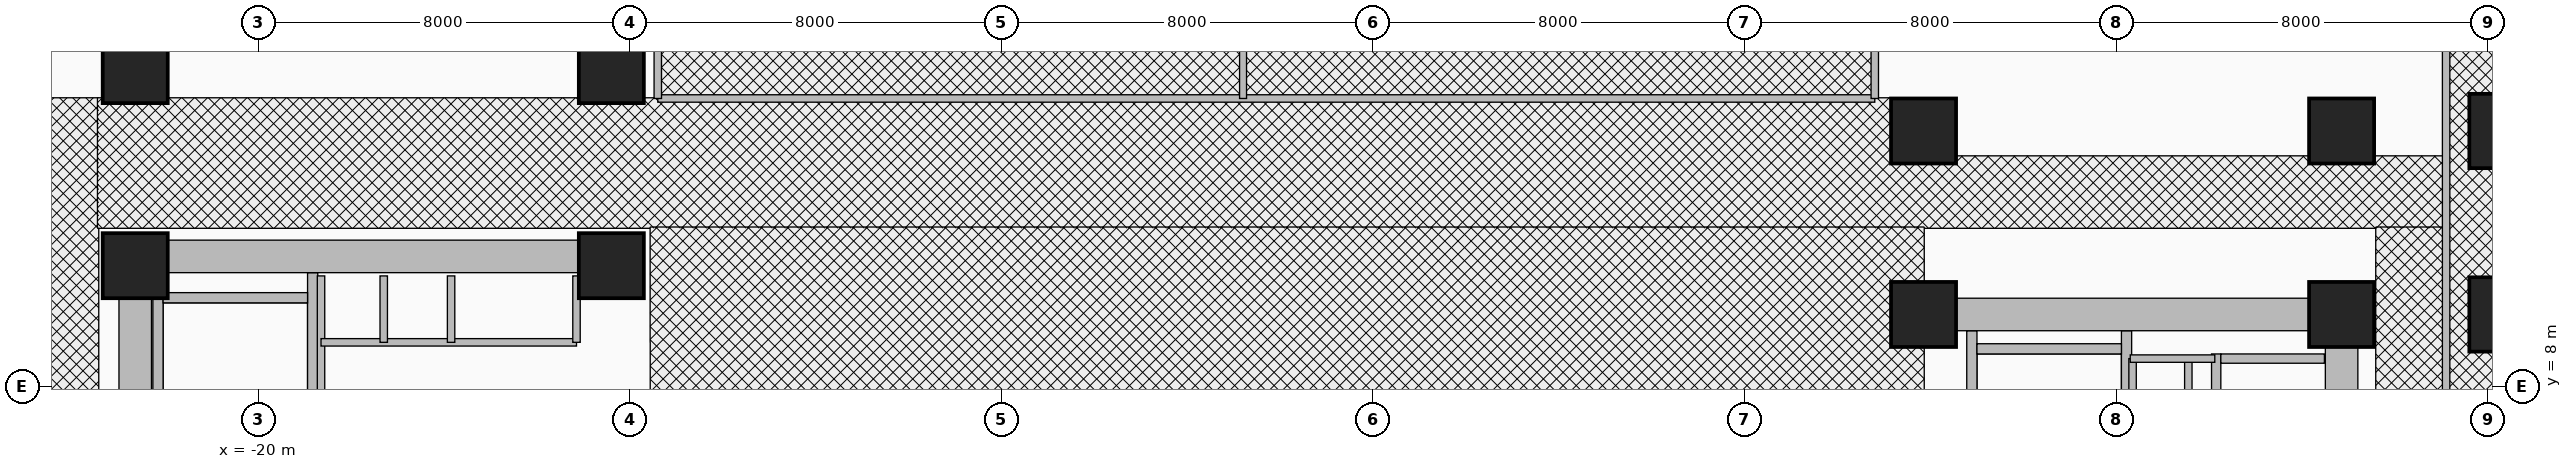
"""IFC4 building model, lengths in metres.
Left out: names, types, materials, properties, quantities, classifications, styles, units other than length and angle.
Written with IfcOpenShell. Run it as: python <this file> out.ifc"""

import sys

from ifc_helpers import new_model, si_unit, direction, frame, frame_2d, origin, origin_2d, place, context, subcontext, project, spatial, rectangle, extrude, source, transform, mapped, element, fill, save


model = new_model("IFC4")
c1 = context("Model", 3, precision=1e-05, world=origin(), true_north=direction((0.0, 1.0)))
c2 = subcontext(c1, "Body", "Model", "MODEL_VIEW")
j1 = project(units=[si_unit("LENGTHUNIT", "METRE"), si_unit("PLANEANGLEUNIT", "RADIAN")], contexts=[c1])
p1 = place(None, origin())
s1 = spatial("IfcSite", under=j1, at=p1, CompositionType="ELEMENT")
p2 = place(p1, origin())
s2 = spatial("IfcBuilding", under=s1, at=p2, CompositionType="ELEMENT")
p3 = place(p2, frame((0.0, 0.0, 10.4)))
s3 = spatial("IfcBuildingStorey", under=s2, at=p3, CompositionType="ELEMENT", Elevation=10.4)
for number, where, z_axis, x_axis in (
    (1, (-22.16, 1.78, 0.0), (0.0, 0.0, 1.0), (0.0, 1.0, 0.0)),
    (2, (-18.83, 1.78, 0.0), (0.0, 0.0, 1.0), (0.0, 1.0, 0.0)),
):
    element("IfcWall", number, at=place(p3, frame(where, z_axis=z_axis, x_axis=x_axis)), inside=s3, PredefinedType="SHEAR", context=c2, shape_type="SweptSolid", body=[
        extrude(rectangle(XDim=8.67, YDim=0.22, at=frame_2d((4.335, 0.0))), origin(), (0.0, 0.0, 1.0), 4.92),
    ])
p4 = place(p3, frame((-22.05, 9.91, 0.0), z_axis=(0.0, 0.0, 1.0), x_axis=(1.0, 0.0, 0.0)))
e3 = element("IfcWall", 3, at=p4, inside=s3, PredefinedType="SHEAR", context=c2, shape_type="SweptSolid", body=[
    extrude(rectangle(XDim=3.11, YDim=0.22, at=frame_2d((1.555, 0.0))), origin(), (0.0, 0.0, 1.0), 4.92),
])
for number, where, z_axis, x_axis in (
    (4, (16.89, 0.68, 0.0), (0.0, 0.0, 1.0), (0.0, 1.0, 0.0)),
    (5, (20.22, 0.68, 0.0), (0.0, 0.0, 1.0), (0.0, 1.0, 0.0)),
):
    element("IfcWall", number, at=place(p3, frame(where, z_axis=z_axis, x_axis=x_axis)), inside=s3, PredefinedType="SHEAR", context=c2, shape_type="SweptSolid", body=[
        extrude(rectangle(XDim=8.52, YDim=0.22, at=frame_2d((4.26, 0.0))), origin(), (0.0, 0.0, 1.0), 4.92),
    ])
p5 = place(p3, frame((17.0, 8.81, 0.0), z_axis=(0.0, 0.0, 1.0), x_axis=(1.0, 0.0, 0.0)))
e6 = element("IfcWall", 6, at=p5, inside=s3, PredefinedType="SHEAR", context=c2, shape_type="SweptSolid", body=[
    extrude(rectangle(XDim=3.11, YDim=0.22, at=frame_2d((1.555, 0.0))), origin(), (0.0, 0.0, 1.0), 4.92),
])
p6 = place(p3, frame((-22.65, -11.15, 0.0), z_axis=(0.0, 0.0, 1.0), x_axis=(0.0, 1.0, 0.0)))
e7 = element("IfcWall", 7, at=p6, inside=s3, PredefinedType="SHEAR", context=c2, shape_type="SweptSolid", body=[
    extrude(rectangle(XDim=22.3, YDim=0.7, at=frame_2d((11.15, 0.0))), origin(), (0.0, 0.0, 1.0), 4.92),
])
p7 = place(p3, frame((-22.65, 10.8, 0.0), z_axis=(0.0, 0.0, 1.0), x_axis=(1.0, 0.0, 0.0)))
e8 = element("IfcWall", 8, at=p7, inside=s3, PredefinedType="SHEAR", context=c2, shape_type="SweptSolid", body=[
    extrude(rectangle(XDim=10.25, YDim=0.7, at=frame_2d((5.125, 0.0))), origin(), (0.0, 0.0, 1.0), 4.92),
])
p8 = place(p3, frame((24.85, 0.95, 0.0), z_axis=(0.0, 0.0, 1.0), x_axis=(0.0, 1.0, 0.0)))
e9 = element("IfcWall", 9, at=p8, inside=s3, PredefinedType="SHEAR", context=c2, shape_type="SweptSolid", body=[
    extrude(rectangle(XDim=8.95, YDim=0.7, at=frame_2d((4.475, 0.0))), origin(), (0.0, 0.0, 1.0), 4.92),
])
p9 = place(p3, frame((15.85, 9.55, 0.0), z_axis=(0.0, 0.0, 1.0), x_axis=(1.0, 0.0, 0.0)))
e10 = element("IfcWall", 10, at=p9, inside=s3, PredefinedType="SHEAR", context=c2, shape_type="SweptSolid", body=[
    extrude(rectangle(XDim=9.0, YDim=0.7, at=frame_2d((4.5, 0.0))), origin(), (0.0, 0.0, 1.0), 4.92),
])
m1 = source(origin(), c2, "Body", "SweptSolid", [
    extrude(rectangle(XDim=1.4, YDim=1.4, at=origin_2d()), origin(), (0.0, 0.0, 1.0), 5.2),
])
for number, where, z_axis, x_axis in (
    (11, (-22.65, 10.6, 0.0), (0.0, 0.0, 1.0), (1.0, 0.0, 0.0)),
    (12, (-12.4, 10.6, 0.0), (0.0, 0.0, 1.0), (1.0, 0.0, 0.0)),
    (13, (-22.65, 14.8, 0.0), (0.0, 0.0, 1.0), (1.0, 0.0, 0.0)),
    (14, (-12.4, 14.8, 0.0), (0.0, 0.0, 1.0), (1.0, 0.0, 0.0)),
    (15, (15.85, 9.55, 0.0), (0.0, 0.0, 1.0), (1.0, 0.0, 0.0)),
    (16, (24.85, 9.55, 0.0), (0.0, 0.0, 1.0), (1.0, 0.0, 0.0)),
):
    element("IfcColumn", number, at=place(p3, frame(where, z_axis=z_axis, x_axis=x_axis)), inside=s3, PredefinedType="COLUMN", context=c2, shape_type="MappedRepresentation", body=[
        mapped(m1, transform((0.0, 0.0, 0.0), x_axis=(1.0, 0.0, 0.0), y_axis=(0.0, 1.0, 0.0), z_axis=(0.0, 0.0, 1.0), scale=1.0)),
    ])
m2 = source(origin(), c2, "Body", "SweptSolid", [
    extrude(rectangle(XDim=1.6, YDim=1.6, at=origin_2d()), origin(), (0.0, 0.0, 1.0), 5.2),
])
p10 = place(p3, frame((28.4, 9.55, 0.0), z_axis=(0.0, 0.0, 1.0), x_axis=(1.0, 0.0, 0.0)))
e17 = element("IfcColumn", 17, at=p10, inside=s3, PredefinedType="COLUMN", context=c2, shape_type="MappedRepresentation", body=[
    mapped(m2, transform((0.0, 0.0, 0.0), x_axis=(1.0, 0.0, 0.0), y_axis=(0.0, 1.0, 0.0), z_axis=(0.0, 0.0, 1.0), scale=1.0)),
])
for number, where, z_axis, x_axis in (
    (18, (15.85, 13.5, 0.0), (0.0, 0.0, 1.0), (1.0, 0.0, 0.0)),
    (19, (24.85, 13.5, 0.0), (0.0, 0.0, 1.0), (1.0, 0.0, 0.0)),
):
    element("IfcColumn", number, at=place(p3, frame(where, z_axis=z_axis, x_axis=x_axis)), inside=s3, PredefinedType="COLUMN", context=c2, shape_type="MappedRepresentation", body=[
        mapped(m1, transform((0.0, 0.0, 0.0), x_axis=(1.0, 0.0, 0.0), y_axis=(0.0, 1.0, 0.0), z_axis=(0.0, 0.0, 1.0), scale=1.0)),
    ])
p11 = place(p3, frame((28.4, 13.5, 0.0), z_axis=(0.0, 0.0, 1.0), x_axis=(1.0, 0.0, 0.0)))
e20 = element("IfcColumn", 20, at=p11, inside=s3, PredefinedType="COLUMN", context=c2, shape_type="MappedRepresentation", body=[
    mapped(m2, transform((0.0, 0.0, 0.0), x_axis=(1.0, 0.0, 0.0), y_axis=(0.0, 1.0, 0.0), z_axis=(0.0, 0.0, 1.0), scale=1.0)),
])
p12 = place(p3, frame((22.15, 6.225, 0.0), z_axis=(0.0, 0.0, 1.0), x_axis=(0.0, 1.0, 0.0)))
e21 = element("IfcWall", 21, at=p12, inside=s3, PredefinedType="MOVABLE", context=c2, shape_type="SweptSolid", body=[
    extrude(rectangle(XDim=2.475, YDim=0.2, at=frame_2d((1.237, 0.0))), origin(), (0.0, 0.0, 1.0), 4.92),
])
p13 = place(p3, frame((22.25, 8.6, 0.0), z_axis=(0.0, 0.0, 1.0), x_axis=(1.0, 0.0, 0.0)))
e22 = element("IfcWall", 22, at=p13, inside=s3, PredefinedType="MOVABLE", context=c2, shape_type="SweptSolid", body=[
    extrude(rectangle(XDim=2.23, YDim=0.2, at=frame_2d((1.115, 0.0))), origin(), (0.0, 0.0, 1.0), 3.745),
])
p14 = place(p3, frame((-18.65, 7.45, 0.0), z_axis=(0.0, 0.0, 1.0), x_axis=(0.0, 1.0, 0.0)))
e23 = element("IfcWall", 23, at=p14, inside=s3, PredefinedType="PARTITIONING", context=c2, shape_type="SweptSolid", body=[
    extrude(rectangle(XDim=2.93, YDim=0.16, at=frame_2d((1.465, 0.0))), origin(), (0.0, 0.0, 1.0), 3.957),
])
p15 = place(p3, frame((-18.65, 8.95, 0.0), z_axis=(0.0, 0.0, 1.0), x_axis=(1.0, 0.0, 0.0)))
e24 = element("IfcWall", 24, at=p15, inside=s3, PredefinedType="PARTITIONING", context=c2, shape_type="SweptSolid", body=[
    extrude(rectangle(XDim=5.5, YDim=0.16, at=frame_2d((2.75, 0.0))), origin(), (0.0, 0.0, 1.0), 4.92),
])
p16 = place(p15, frame((0.3, 0.0, 0.0)))
e25 = element("IfcOpeningElement", 25, at=p16, cuts=e24, PredefinedType="OPENING", context=c2, shape_type="SweptSolid", body=[
    extrude(rectangle(XDim=0.85, YDim=2.05, at=frame_2d((0.425, 1.025))), frame((0.0, 0.095, 0.0), z_axis=(0.0, -1.0, 0.0), x_axis=(1.0, 0.0, 0.0)), (0.0, 0.0, 1.0), 0.19),
])
p17 = place(p15, frame((3.2, 0.0, 0.0)))
e26 = element("IfcOpeningElement", 26, at=p17, cuts=e24, PredefinedType="OPENING", context=c2, shape_type="SweptSolid", body=[
    extrude(rectangle(XDim=0.85, YDim=2.05, at=frame_2d((0.425, 1.025))), frame((0.0, 0.095, 0.0), z_axis=(0.0, -1.0, 0.0), x_axis=(1.0, 0.0, 0.0)), (0.0, 0.0, 1.0), 0.19),
])
for number, where, z_axis, x_axis in (
    (27, (-13.15, 8.95, 0.0), (0.0, 0.0, 1.0), (0.0, 1.0, 0.0)),
    (28, (-17.3, 8.95, 0.0), (0.0, 0.0, 1.0), (0.0, 1.0, 0.0)),
):
    element("IfcWall", number, at=place(p3, frame(where, z_axis=z_axis, x_axis=x_axis)), inside=s3, PredefinedType="PARTITIONING", context=c2, shape_type="SweptSolid", body=[
        extrude(rectangle(XDim=1.43, YDim=0.16, at=frame_2d((0.715, 0.0))), origin(), (0.0, 0.0, 1.0), 3.957),
    ])
p18 = place(p3, frame((-15.85, 8.95, 0.0), z_axis=(0.0, 0.0, 1.0), x_axis=(0.0, 1.0, 0.0)))
e29 = element("IfcWall", 29, at=p18, inside=s3, PredefinedType="PARTITIONING", context=c2, shape_type="SweptSolid", body=[
    extrude(rectangle(XDim=1.43, YDim=0.16, at=frame_2d((0.715, 0.0))), origin(), (0.0, 0.0, 1.0), 3.957),
])
p19 = place(p18, frame((0.29, 0.0, 0.0)))
e30 = element("IfcOpeningElement", 30, at=p19, cuts=e29, PredefinedType="OPENING", context=c2, shape_type="SweptSolid", body=[
    extrude(rectangle(XDim=0.85, YDim=2.05, at=frame_2d((0.425, 1.025))), frame((0.0, 0.095, 0.0), z_axis=(0.0, -1.0, 0.0), x_axis=(1.0, 0.0, 0.0)), (0.0, 0.0, 1.0), 0.19),
])
for number, where, z_axis, x_axis in (
    (31, (21.55, 6.8, 0.0), (0.0, 0.0, 1.0), (0.0, 1.0, 0.0)),
    (32, (20.35, 6.8, 0.0), (0.0, 0.0, 1.0), (0.0, 1.0, 0.0)),
):
    element("IfcWall", number, at=place(p3, frame(where, z_axis=z_axis, x_axis=x_axis)), inside=s3, PredefinedType="PARTITIONING", context=c2, shape_type="SweptSolid", body=[
        extrude(rectangle(XDim=1.8, YDim=0.16, at=frame_2d((0.9, 0.0))), origin(), (0.0, 0.0, 1.0), 4.92),
    ])
p20 = place(p3, frame((20.3, 8.6, 0.0), z_axis=(0.0, 0.0, 1.0), x_axis=(1.0, 0.0, 0.0)))
e33 = element("IfcWall", 33, at=p20, inside=s3, PredefinedType="PARTITIONING", context=c2, shape_type="SweptSolid", body=[
    extrude(rectangle(XDim=1.82, YDim=0.16, at=frame_2d((0.91, 0.0))), origin(), (0.0, 0.0, 1.0), 4.92),
])
p21 = place(p3, frame((-11.4, 14.2, 0.0), z_axis=(0.0, 0.0, 1.0), x_axis=(1.0, 0.0, 0.0)))
e34 = element("IfcWall", 34, at=p21, inside=s3, PredefinedType="PARTITIONING", context=c2, shape_type="SweptSolid", body=[
    extrude(rectangle(XDim=26.2, YDim=0.16, at=frame_2d((13.1, 0.0))), origin(), (0.0, 0.0, 1.0), 4.92),
])
p22 = place(p21, frame((4.5, 0.0, 0.0)))
e35 = element("IfcOpeningElement", 35, at=p22, cuts=e34, PredefinedType="OPENING", context=c2, shape_type="SweptSolid", body=[
    extrude(rectangle(XDim=1.8, YDim=2.15, at=frame_2d((0.9, 1.075))), frame((0.0, 0.095, 0.0), z_axis=(0.0, -1.0, 0.0), x_axis=(1.0, 0.0, 0.0)), (0.0, 0.0, 1.0), 0.19),
])
p23 = place(p21, frame((17.5, 0.0, 0.0)))
e36 = element("IfcOpeningElement", 36, at=p23, cuts=e34, PredefinedType="OPENING", context=c2, shape_type="SweptSolid", body=[
    extrude(rectangle(XDim=1.8, YDim=2.15, at=frame_2d((0.9, 1.075))), frame((0.0, 0.095, 0.0), z_axis=(0.0, -1.0, 0.0), x_axis=(1.0, 0.0, 0.0)), (0.0, 0.0, 1.0), 0.19),
])
for number, where, z_axis, x_axis in (
    (37, (-11.4, 14.2, 0.0), (0.0, 0.0, 1.0), (0.0, 1.0, 0.0)),
    (38, (14.8, 14.2, 0.0), (0.0, 0.0, 1.0), (0.0, 1.0, 0.0)),
):
    element("IfcWall", number, at=place(p3, frame(where, z_axis=z_axis, x_axis=x_axis)), inside=s3, PredefinedType="PARTITIONING", context=c2, shape_type="SweptSolid", body=[
        extrude(rectangle(XDim=8.54, YDim=0.16, at=frame_2d((4.27, 0.0))), origin(), (0.0, 0.0, 1.0), 3.957),
    ])
p24 = place(p3, frame((1.2, 14.2, 0.0), z_axis=(0.0, 0.0, 1.0), x_axis=(0.0, 1.0, 0.0)))
e39 = element("IfcWall", 39, at=p24, inside=s3, PredefinedType="PARTITIONING", context=c2, shape_type="SweptSolid", body=[
    extrude(rectangle(XDim=8.54, YDim=0.15, at=frame_2d((4.27, 0.0))), origin(), (0.0, 0.0, 1.0), 3.957),
])
p25 = place(p3, frame((27.1, -22.74, 0.0), z_axis=(0.0, 0.0, 1.0), x_axis=(0.0, 1.0, 0.0)))
e40 = element("IfcWall", 40, at=p25, inside=s3, PredefinedType="PARTITIONING", context=c2, shape_type="SweptSolid", body=[
    extrude(rectangle(XDim=45.48, YDim=0.16, at=frame_2d((22.74, 0.0))), origin(), (0.0, 0.0, 1.0), 3.957),
])
p26 = place(p25, frame((7.0, 0.0, 0.0)))
e41 = element("IfcOpeningElement", 41, at=p26, cuts=e40, PredefinedType="OPENING", context=c2, shape_type="SweptSolid", body=[
    extrude(rectangle(XDim=1.8, YDim=2.15, at=frame_2d((0.9, 1.075))), frame((0.0, 0.095, 0.0), z_axis=(0.0, -1.0, 0.0), x_axis=(1.0, 0.0, 0.0)), (0.0, 0.0, 1.0), 0.19),
])
p27 = place(p25, frame((25.0, 0.0, 0.0)))
e42 = element("IfcOpeningElement", 42, at=p27, cuts=e40, PredefinedType="OPENING", context=c2, shape_type="SweptSolid", body=[
    extrude(rectangle(XDim=1.8, YDim=2.15, at=frame_2d((0.9, 1.075))), frame((0.0, 0.095, 0.0), z_axis=(0.0, -1.0, 0.0), x_axis=(1.0, 0.0, 0.0)), (0.0, 0.0, 1.0), 0.19),
])
p28 = place(p16, origin())
e43 = element("IfcDoor", 43, at=p28, inside=s3, OperationType="SINGLE_SWING_LEFT", PredefinedType="DOOR", context=c2, shape_type="SweptSolid", body=[
    extrude(rectangle(XDim=0.85, YDim=2.05, at=frame_2d((0.425, 1.025))), frame((0.0, 0.025, 0.0), z_axis=(0.0, -1.0, 0.0), x_axis=(1.0, 0.0, 0.0)), (0.0, 0.0, 1.0), 0.05),
])
fill(e25, e43)
p29 = place(p17, origin())
e44 = element("IfcDoor", 44, at=p29, inside=s3, OperationType="SINGLE_SWING_RIGHT", PredefinedType="DOOR", context=c2, shape_type="SweptSolid", body=[
    extrude(rectangle(XDim=0.85, YDim=2.05, at=frame_2d((0.425, 1.025))), frame((0.0, 0.025, 0.0), z_axis=(0.0, -1.0, 0.0), x_axis=(1.0, 0.0, 0.0)), (0.0, 0.0, 1.0), 0.05),
])
fill(e26, e44)
p30 = place(p19, origin())
e45 = element("IfcDoor", 45, at=p30, inside=s3, OperationType="SINGLE_SWING_LEFT", PredefinedType="DOOR", context=c2, shape_type="SweptSolid", body=[
    extrude(rectangle(XDim=0.85, YDim=2.05, at=frame_2d((0.425, 1.025))), frame((0.0, 0.025, 0.0), z_axis=(0.0, -1.0, 0.0), x_axis=(1.0, 0.0, 0.0)), (0.0, 0.0, 1.0), 0.05),
])
fill(e30, e45)
p31 = place(p22, origin())
e46 = element("IfcDoor", 46, at=p31, inside=s3, OperationType="DOUBLE_DOOR_SINGLE_SWING", PredefinedType="DOOR", context=c2, shape_type="SweptSolid", body=[
    extrude(rectangle(XDim=1.8, YDim=2.15, at=frame_2d((0.9, 1.075))), frame((0.0, 0.025, 0.0), z_axis=(0.0, -1.0, 0.0), x_axis=(1.0, 0.0, 0.0)), (0.0, 0.0, 1.0), 0.05),
])
fill(e35, e46)
p32 = place(p23, frame((1.8, 0.0, 0.0), z_axis=(0.0, 0.0, 1.0), x_axis=(-1.0, 0.0, 0.0)))
e47 = element("IfcDoor", 47, at=p32, inside=s3, OperationType="DOUBLE_DOOR_SINGLE_SWING", PredefinedType="DOOR", context=c2, shape_type="SweptSolid", body=[
    extrude(rectangle(XDim=1.8, YDim=2.15, at=frame_2d((0.9, 1.075))), frame((0.0, 0.025, 0.0), z_axis=(0.0, -1.0, 0.0), x_axis=(1.0, 0.0, 0.0)), (0.0, 0.0, 1.0), 0.05),
])
fill(e36, e47)
save(model, sys.argv[1])
